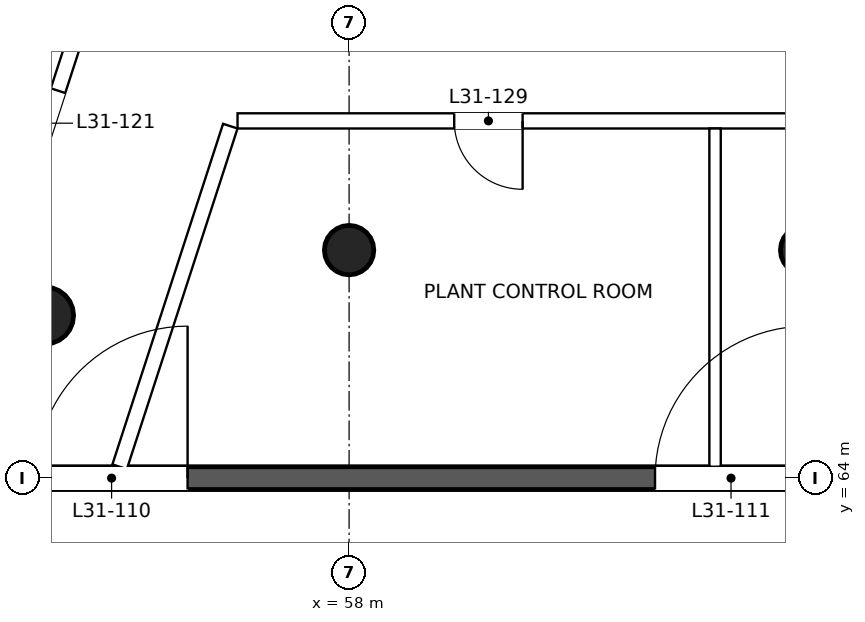
"""IFC4 building model, lengths in metres.
Left out: names, types, materials, properties, quantities, classifications, styles, units other than length and angle.
Written with IfcOpenShell. Run it as: python <this file> out.ifc"""

import sys

from ifc_helpers import new_model, si_unit, direction, frame, frame_2d, origin, origin_2d, place, context, subcontext, project, spatial, rectangle, circle, extrude, element, fill, save


model = new_model("IFC4")
c1 = context("Model", 3, precision=1e-05, world=origin(), true_north=direction((0.0, 1.0)))
c2 = subcontext(c1, "Body", "Model", "MODEL_VIEW")
j1 = project(units=[si_unit("LENGTHUNIT", "METRE"), si_unit("PLANEANGLEUNIT", "RADIAN")], contexts=[c1])
p1 = place(None, origin())
s1 = spatial("IfcSite", under=j1, at=p1, CompositionType="ELEMENT")
p2 = place(p1, origin())
s2 = spatial("IfcBuilding", under=s1, at=p2, CompositionType="ELEMENT")
p3 = place(p2, frame((0.0, 0.0, 137.6)))
s3 = spatial("IfcBuildingStorey", under=s2, at=p3, CompositionType="ELEMENT", Elevation=137.6)
p4 = place(p3, frame((54.0, 66.14, 0.0), z_axis=(0.0, 0.0, 1.0), x_axis=(1.0, 0.0, 0.0)))
e1 = element("IfcColumn", 1, at=p4, inside=s3, PredefinedType="COLUMN", context=c2, shape_type="SweptSolid", body=[
    extrude(circle(Radius=0.375, at=origin_2d()), origin(), (0.0, 0.0, 1.0), 5.0),
])
for number, where, z_axis, x_axis in (
    (2, (58.0, 67.0, 0.0), (0.0, 0.0, 1.0), (1.0, 0.0, 0.0)),
    (3, (64.0, 67.0, 0.0), (0.0, 0.0, 1.0), (1.0, 0.0, 0.0)),
):
    element("IfcColumn", number, at=place(p3, frame(where, z_axis=z_axis, x_axis=x_axis)), inside=s3, PredefinedType="COLUMN", context=c2, shape_type="SweptSolid", body=[
        extrude(circle(Radius=0.325, at=origin_2d()), origin(), (0.0, 0.0, 1.0), 5.0),
    ])
p5 = place(p3, frame((45.49, 64.0, 0.0), z_axis=(0.0, 0.0, 1.0), x_axis=(1.0, 0.0, 0.0)))
e4 = element("IfcWall", 4, at=p5, inside=s3, PredefinedType="PARTITIONING", context=c2, shape_type="SweptSolid", body=[
    extrude(rectangle(XDim=49.02, YDim=0.3, at=frame_2d((24.51, 0.0))), origin(), (0.0, 0.0, 1.0), 3.9),
])
p6 = place(p5, frame((8.385, 0.0, 0.0)))
e5 = element("IfcOpeningElement", 5, at=p6, cuts=e4, PredefinedType="OPENING", context=c2, shape_type="SweptSolid", body=[
    extrude(rectangle(XDim=2.0, YDim=2.1, at=frame_2d((1.0, 1.05))), frame((0.0, 0.16, 0.0), z_axis=(0.0, -1.0, 0.0), x_axis=(1.0, 0.0, 0.0)), (0.0, 0.0, 1.0), 0.32),
])
p7 = place(p5, frame((16.535, 0.0, 0.0)))
e6 = element("IfcOpeningElement", 6, at=p7, cuts=e4, PredefinedType="OPENING", context=c2, shape_type="SweptSolid", body=[
    extrude(rectangle(XDim=2.0, YDim=2.1, at=frame_2d((1.0, 1.05))), frame((0.0, 0.16, 0.0), z_axis=(0.0, -1.0, 0.0), x_axis=(1.0, 0.0, 0.0)), (0.0, 0.0, 1.0), 0.32),
])
p8 = place(p5, frame((23.91, 0.0, 0.0)))
e7 = element("IfcOpeningElement", 7, at=p8, cuts=e4, PredefinedType="OPENING", context=c2, shape_type="SweptSolid", body=[
    extrude(rectangle(XDim=1.2, YDim=2.1, at=frame_2d((0.6, 1.05))), frame((0.0, 0.16, 0.0), z_axis=(0.0, -1.0, 0.0), x_axis=(1.0, 0.0, 0.0)), (0.0, 0.0, 1.0), 0.32),
])
p9 = place(p5, frame((30.435, 0.0, 0.0)))
e8 = element("IfcOpeningElement", 8, at=p9, cuts=e4, PredefinedType="OPENING", context=c2, shape_type="SweptSolid", body=[
    extrude(rectangle(XDim=2.0, YDim=2.1, at=frame_2d((1.0, 1.05))), frame((0.0, 0.16, 0.0), z_axis=(0.0, -1.0, 0.0), x_axis=(1.0, 0.0, 0.0)), (0.0, 0.0, 1.0), 0.32),
])
p10 = place(p5, frame((38.635, 0.0, 0.0)))
e9 = element("IfcOpeningElement", 9, at=p10, cuts=e4, PredefinedType="OPENING", context=c2, shape_type="SweptSolid", body=[
    extrude(rectangle(XDim=2.0, YDim=2.1, at=frame_2d((1.0, 1.05))), frame((0.0, 0.16, 0.0), z_axis=(0.0, -1.0, 0.0), x_axis=(1.0, 0.0, 0.0)), (0.0, 0.0, 1.0), 0.32),
])
p11 = place(p3, frame((52.563, 64.15, 0.0), z_axis=(0.0, 0.0, 1.0), x_axis=(0.309005574406, 0.951060226792, 0.0)))
e10 = element("IfcWall", 10, at=p11, inside=s3, PredefinedType="PARTITIONING", context=c2, shape_type="SweptSolid", body=[
    extrude(rectangle(XDim=13.373, YDim=0.2, at=frame_2d((6.687, 0.0))), origin(), (0.0, 0.0, 1.0), 4.6),
])
p12 = place(p11, frame((4.302, 0.0, 0.0)))
e11 = element("IfcOpeningElement", 11, at=p12, cuts=e10, PredefinedType="OPENING", context=c2, shape_type="SweptSolid", body=[
    extrude(rectangle(XDim=0.9, YDim=2.1, at=frame_2d((0.45, 1.05))), frame((0.0, 0.11, 0.0), z_axis=(0.0, -1.0, 0.0), x_axis=(1.0, 0.0, 0.0)), (0.0, 0.0, 1.0), 0.22),
])
p13 = place(p11, frame((10.632, 0.0, 0.0)))
e12 = element("IfcOpeningElement", 12, at=p13, cuts=e10, PredefinedType="OPENING", context=c2, shape_type="SweptSolid", body=[
    extrude(rectangle(XDim=0.9, YDim=2.1, at=frame_2d((0.45, 1.05))), frame((0.0, 0.11, 0.0), z_axis=(0.0, -1.0, 0.0), x_axis=(1.0, 0.0, 0.0)), (0.0, 0.0, 1.0), 0.22),
])
p14 = place(p3, frame((68.75, 68.7, 0.0), z_axis=(0.0, 0.0, 1.0), x_axis=(-1.0, 0.0, 0.0)))
e13 = element("IfcWall", 13, at=p14, inside=s3, PredefinedType="PARTITIONING", context=c2, shape_type="SweptSolid", body=[
    extrude(rectangle(XDim=12.218, YDim=0.2, at=frame_2d((6.109, 0.0))), origin(), (0.0, 0.0, 1.0), 4.6),
])
p15 = place(p14, frame((2.468, 0.0, 0.0)))
e14 = element("IfcOpeningElement", 14, at=p15, cuts=e13, PredefinedType="OPENING", context=c2, shape_type="SweptSolid", body=[
    extrude(rectangle(XDim=0.9, YDim=2.1, at=frame_2d((0.45, 1.05))), frame((0.0, 0.11, 0.0), z_axis=(0.0, -1.0, 0.0), x_axis=(1.0, 0.0, 0.0)), (0.0, 0.0, 1.0), 0.22),
])
p16 = place(p14, frame((8.467, 0.0, 0.0)))
e15 = element("IfcOpeningElement", 15, at=p16, cuts=e13, PredefinedType="OPENING", context=c2, shape_type="SweptSolid", body=[
    extrude(rectangle(XDim=0.9, YDim=2.1, at=frame_2d((0.45, 1.05))), frame((0.0, 0.11, 0.0), z_axis=(0.0, -1.0, 0.0), x_axis=(1.0, 0.0, 0.0)), (0.0, 0.0, 1.0), 0.22),
])
p17 = place(p3, frame((56.437, 68.631, 0.0), z_axis=(0.0, 0.0, 1.0), x_axis=(-0.309036861841, -0.951050060735, 0.0)))
e16 = element("IfcWall", 16, at=p17, inside=s3, PredefinedType="PARTITIONING", context=c2, shape_type="SweptSolid", body=[
    extrude(rectangle(XDim=4.712, YDim=0.2, at=frame_2d((2.356, 0.0))), origin(), (0.0, 0.0, 1.0), 4.6),
])
p18 = place(p3, frame((62.815, 64.15, 0.0), z_axis=(0.0, 0.0, 1.0), x_axis=(0.0, 1.0, 0.0)))
e17 = element("IfcWall", 17, at=p18, inside=s3, PredefinedType="PARTITIONING", context=c2, shape_type="SweptSolid", body=[
    extrude(rectangle(XDim=4.45, YDim=0.15, at=frame_2d((2.225, 0.0))), origin(), (0.0, 0.0, 1.0), 4.6),
])
p19 = place(p6, origin())
e18 = element("IfcDoor", 18, at=p19, inside=s3, OperationType="DOUBLE_DOOR_SINGLE_SWING", PredefinedType="DOOR", context=c2, shape_type="SweptSolid", body=[
    extrude(rectangle(XDim=2.0, YDim=2.1, at=frame_2d((1.0, 1.05))), frame((0.0, 0.025, 0.0), z_axis=(0.0, -1.0, 0.0), x_axis=(1.0, 0.0, 0.0)), (0.0, 0.0, 1.0), 0.05),
])
fill(e5, e18)
p20 = place(p7, origin())
e19 = element("IfcDoor", 19, at=p20, inside=s3, OperationType="DOUBLE_DOOR_SINGLE_SWING", PredefinedType="DOOR", context=c2, shape_type="SweptSolid", body=[
    extrude(rectangle(XDim=2.0, YDim=2.1, at=frame_2d((1.0, 1.05))), frame((0.0, 0.025, 0.0), z_axis=(0.0, -1.0, 0.0), x_axis=(1.0, 0.0, 0.0)), (0.0, 0.0, 1.0), 0.05),
])
fill(e6, e19)
p21 = place(p12, origin())
e20 = element("IfcDoor", 20, at=p21, inside=s3, OperationType="SINGLE_SWING_LEFT", PredefinedType="DOOR", context=c2, shape_type="SweptSolid", body=[
    extrude(rectangle(XDim=0.9, YDim=2.1, at=frame_2d((0.45, 1.05))), frame((0.0, 0.025, 0.0), z_axis=(0.0, -1.0, 0.0), x_axis=(1.0, 0.0, 0.0)), (0.0, 0.0, 1.0), 0.05),
])
fill(e11, e20)
p22 = place(p16, origin())
e21 = element("IfcDoor", 21, at=p22, inside=s3, OperationType="SINGLE_SWING_LEFT", PredefinedType="DOOR", context=c2, shape_type="SweptSolid", body=[
    extrude(rectangle(XDim=0.9, YDim=2.1, at=frame_2d((0.45, 1.05))), frame((0.0, 0.025, 0.0), z_axis=(0.0, -1.0, 0.0), x_axis=(1.0, 0.0, 0.0)), (0.0, 0.0, 1.0), 0.05),
])
fill(e15, e21)
save(model, sys.argv[1])
